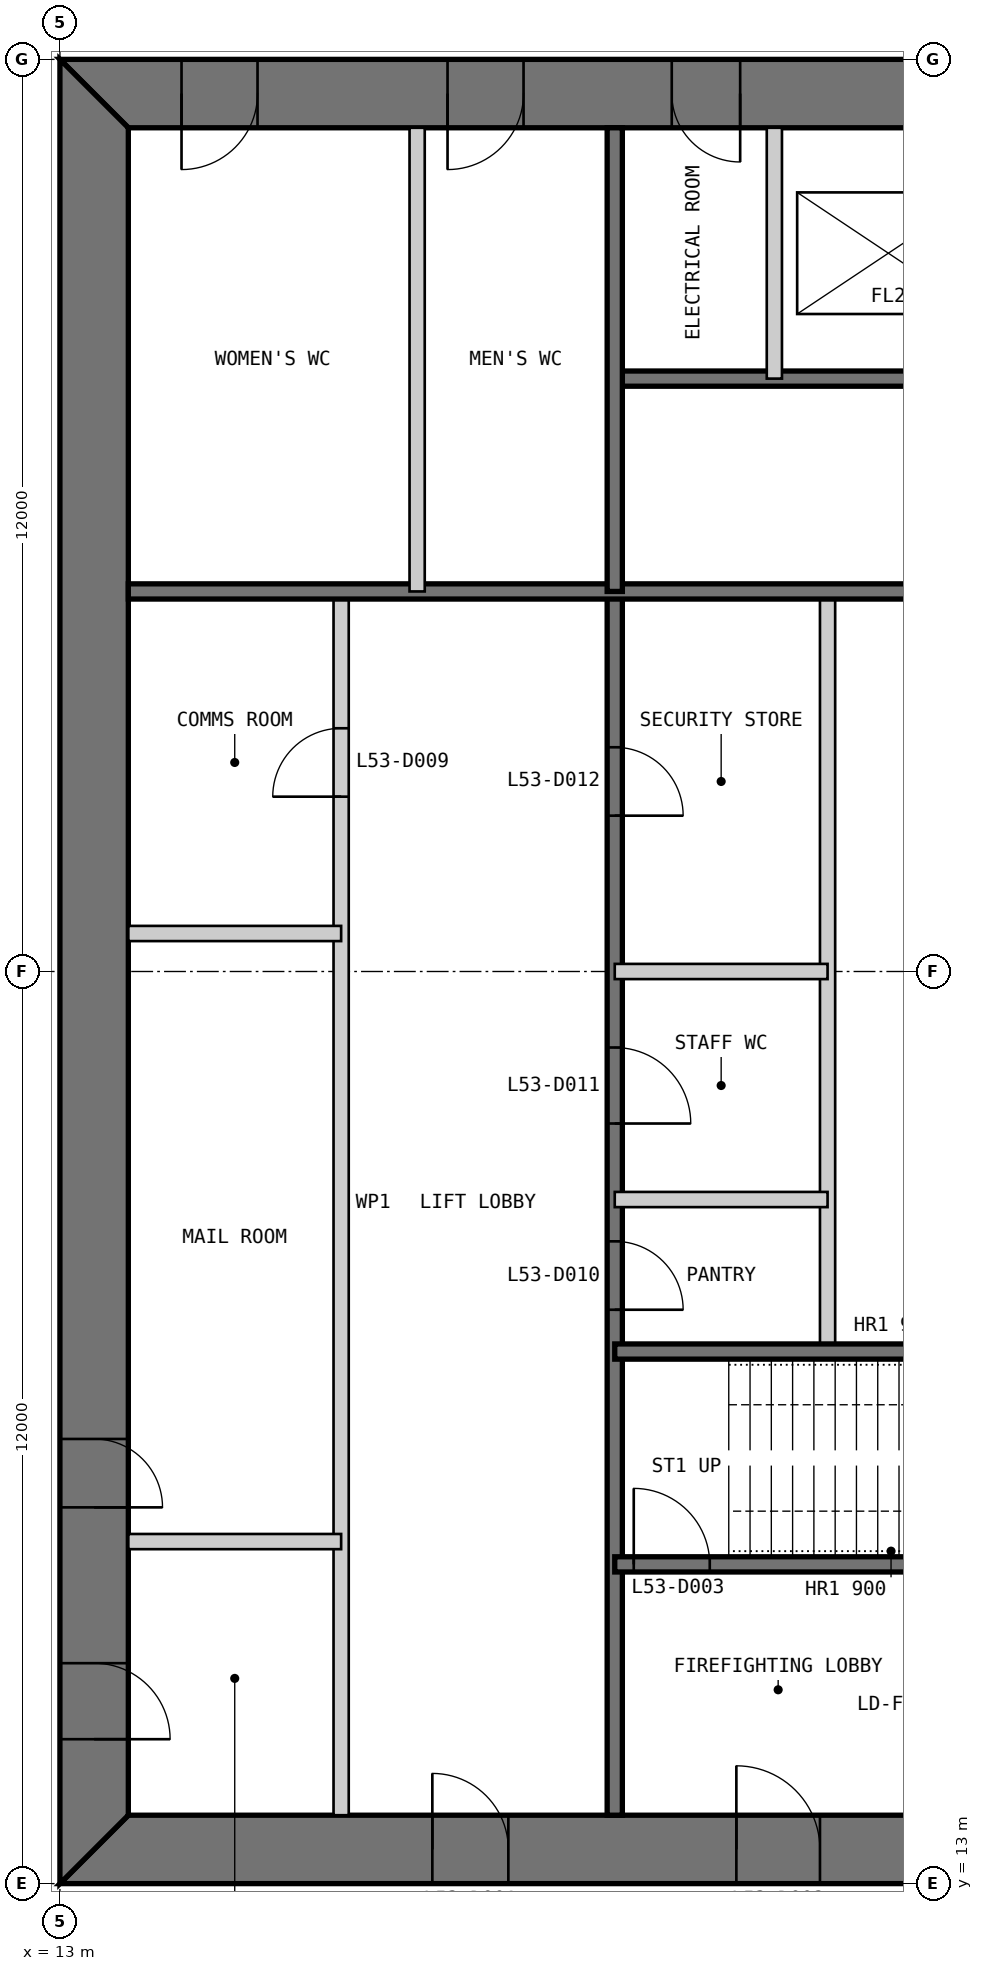
"""IFC4 building model, lengths in metres.
Left out: names, types, materials, properties, quantities, classifications, styles, units other than length and angle.
Written with IfcOpenShell. Run it as: python <this file> out.ifc"""

import sys

from ifc_helpers import new_model, si_unit, direction, frame, frame_2d, origin, place, context, subcontext, project, spatial, polyline, rectangle, outline, extrude, element, fill, save


model = new_model("IFC4")
c1 = context("Model", 3, precision=1e-05, world=origin(), true_north=direction((0.0, 1.0)))
c2 = subcontext(c1, "Body", "Model", "MODEL_VIEW")
j1 = project(units=[si_unit("LENGTHUNIT", "METRE"), si_unit("PLANEANGLEUNIT", "RADIAN")], contexts=[c1])
p1 = place(None, origin())
s1 = spatial("IfcSite", under=j1, at=p1, CompositionType="ELEMENT")
p2 = place(p1, origin())
s2 = spatial("IfcBuilding", under=s1, at=p2, CompositionType="ELEMENT")
p3 = place(p2, frame((0.0, 0.0, 225.8)))
s3 = spatial("IfcBuildingStorey", under=s2, at=p3, CompositionType="ELEMENT", Elevation=225.8)
p4 = place(p3, frame((13.0, 13.45, 0.0), z_axis=(0.0, 0.0, 1.0), x_axis=(1.0, 0.0, 0.0)))
e1 = element("IfcWall", 1, at=p4, inside=s3, PredefinedType="SHEAR", context=c2, shape_type="SweptSolid", body=[
    extrude(outline(polyline([(0.0, -0.45), (24.0, -0.45), (23.1, 0.45), (0.9, 0.45), (0.0, -0.45)])), origin(), (0.0, 0.0, 1.0), 4.0),
])
p5 = place(p4, frame((4.9, 0.0, 0.0)))
e2 = element("IfcOpeningElement", 2, at=p5, cuts=e1, PredefinedType="OPENING", context=c2, shape_type="SweptSolid", body=[
    extrude(rectangle(XDim=1.0, YDim=2.2, at=frame_2d((0.5, 1.1))), frame((0.0, 0.46, 0.0), z_axis=(0.0, -1.0, 0.0), x_axis=(1.0, 0.0, 0.0)), (0.0, 0.0, 1.0), 0.92),
])
p6 = place(p4, frame((8.9, 0.0, 0.0)))
e3 = element("IfcOpeningElement", 3, at=p6, cuts=e1, PredefinedType="OPENING", context=c2, shape_type="SweptSolid", body=[
    extrude(rectangle(XDim=1.1, YDim=2.2, at=frame_2d((0.55, 1.1))), frame((0.0, 0.46, 0.0), z_axis=(0.0, -1.0, 0.0), x_axis=(1.0, 0.0, 0.0)), (0.0, 0.0, 1.0), 0.92),
])
p7 = place(p4, frame((15.05, 0.0, 0.0)))
e4 = element("IfcOpeningElement", 4, at=p7, cuts=e1, PredefinedType="OPENING", context=c2, shape_type="SweptSolid", body=[
    extrude(rectangle(XDim=0.9, YDim=2.2, at=frame_2d((0.45, 1.1))), frame((0.0, 0.46, 0.0), z_axis=(0.0, -1.0, 0.0), x_axis=(1.0, 0.0, 0.0)), (0.0, 0.0, 1.0), 0.92),
])
p8 = place(p4, frame((17.9, 0.0, 0.0)))
e5 = element("IfcOpeningElement", 5, at=p8, cuts=e1, PredefinedType="OPENING", context=c2, shape_type="SweptSolid", body=[
    extrude(rectangle(XDim=1.0, YDim=2.2, at=frame_2d((0.5, 1.1))), frame((0.0, 0.46, 0.0), z_axis=(0.0, -1.0, 0.0), x_axis=(1.0, 0.0, 0.0)), (0.0, 0.0, 1.0), 0.92),
])
p9 = place(p4, frame((21.4, 0.0, 0.0)))
e6 = element("IfcOpeningElement", 6, at=p9, cuts=e1, PredefinedType="OPENING", context=c2, shape_type="SweptSolid", body=[
    extrude(rectangle(XDim=1.0, YDim=2.2, at=frame_2d((0.5, 1.1))), frame((0.0, 0.46, 0.0), z_axis=(0.0, -1.0, 0.0), x_axis=(1.0, 0.0, 0.0)), (0.0, 0.0, 1.0), 0.92),
])
p10 = place(p3, frame((37.0, 36.55, 0.0), z_axis=(0.0, 0.0, 1.0), x_axis=(-1.0, 0.0, 0.0)))
e7 = element("IfcWall", 7, at=p10, inside=s3, PredefinedType="SHEAR", context=c2, shape_type="SweptSolid", body=[
    extrude(outline(polyline([(0.0, -0.45), (24.0, -0.45), (23.1, 0.45), (0.9, 0.45), (0.0, -0.45)])), origin(), (0.0, 0.0, 1.0), 4.0),
])
p11 = place(p10, frame((4.9, 0.0, 0.0)))
e8 = element("IfcOpeningElement", 8, at=p11, cuts=e7, PredefinedType="OPENING", context=c2, shape_type="SweptSolid", body=[
    extrude(rectangle(XDim=1.0, YDim=2.2, at=frame_2d((0.5, 1.1))), frame((0.0, 0.46, 0.0), z_axis=(0.0, -1.0, 0.0), x_axis=(1.0, 0.0, 0.0)), (0.0, 0.0, 1.0), 0.92),
])
p12 = place(p10, frame((8.9, 0.0, 0.0)))
e9 = element("IfcOpeningElement", 9, at=p12, cuts=e7, PredefinedType="OPENING", context=c2, shape_type="SweptSolid", body=[
    extrude(rectangle(XDim=1.1, YDim=2.2, at=frame_2d((0.55, 1.1))), frame((0.0, 0.46, 0.0), z_axis=(0.0, -1.0, 0.0), x_axis=(1.0, 0.0, 0.0)), (0.0, 0.0, 1.0), 0.92),
])
p13 = place(p10, frame((15.05, 0.0, 0.0)))
e10 = element("IfcOpeningElement", 10, at=p13, cuts=e7, PredefinedType="OPENING", context=c2, shape_type="SweptSolid", body=[
    extrude(rectangle(XDim=0.9, YDim=2.2, at=frame_2d((0.45, 1.1))), frame((0.0, 0.46, 0.0), z_axis=(0.0, -1.0, 0.0), x_axis=(1.0, 0.0, 0.0)), (0.0, 0.0, 1.0), 0.92),
])
p14 = place(p10, frame((17.9, 0.0, 0.0)))
e11 = element("IfcOpeningElement", 11, at=p14, cuts=e7, PredefinedType="OPENING", context=c2, shape_type="SweptSolid", body=[
    extrude(rectangle(XDim=1.0, YDim=2.2, at=frame_2d((0.5, 1.1))), frame((0.0, 0.46, 0.0), z_axis=(0.0, -1.0, 0.0), x_axis=(1.0, 0.0, 0.0)), (0.0, 0.0, 1.0), 0.92),
])
p15 = place(p10, frame((21.4, 0.0, 0.0)))
e12 = element("IfcOpeningElement", 12, at=p15, cuts=e7, PredefinedType="OPENING", context=c2, shape_type="SweptSolid", body=[
    extrude(rectangle(XDim=1.0, YDim=2.2, at=frame_2d((0.5, 1.1))), frame((0.0, 0.46, 0.0), z_axis=(0.0, -1.0, 0.0), x_axis=(1.0, 0.0, 0.0)), (0.0, 0.0, 1.0), 0.92),
])
p16 = place(p3, frame((13.45, 36.1, 0.0), z_axis=(0.0, 0.0, 1.0), x_axis=(0.0, -1.0, 0.0)))
e13 = element("IfcWall", 13, at=p16, inside=s3, PredefinedType="SHEAR", context=c2, shape_type="SweptSolid", body=[
    extrude(outline(polyline([(-0.9, -0.45), (23.1, -0.45), (22.2, 0.45), (0.0, 0.45), (-0.9, -0.45)])), origin(), (0.0, 0.0, 1.0), 4.0),
])
p17 = place(p16, frame((20.2, 0.0, 0.0)))
e14 = element("IfcOpeningElement", 14, at=p17, cuts=e13, PredefinedType="OPENING", context=c2, shape_type="SweptSolid", body=[
    extrude(rectangle(XDim=1.0, YDim=2.2, at=frame_2d((0.5, 1.1))), frame((0.0, 0.46, 0.0), z_axis=(0.0, -1.0, 0.0), x_axis=(1.0, 0.0, 0.0)), (0.0, 0.0, 1.0), 0.92),
])
p18 = place(p16, frame((17.25, 0.0, 0.0)))
e15 = element("IfcOpeningElement", 15, at=p18, cuts=e13, PredefinedType="OPENING", context=c2, shape_type="SweptSolid", body=[
    extrude(rectangle(XDim=0.9, YDim=2.2, at=frame_2d((0.45, 1.1))), frame((0.0, 0.46, 0.0), z_axis=(0.0, -1.0, 0.0), x_axis=(1.0, 0.0, 0.0)), (0.0, 0.0, 1.0), 0.92),
])
p19 = place(p3, frame((16.7, 13.9, 0.0), z_axis=(0.0, 0.0, 1.0), x_axis=(0.0, 1.0, 0.0)))
e16 = element("IfcWall", 16, at=p19, inside=s3, PredefinedType="PARTITIONING", context=c2, shape_type="SweptSolid", body=[
    extrude(rectangle(XDim=16.1, YDim=0.2, at=frame_2d((8.05, 0.0))), origin(), (0.0, 0.0, 1.0), 3.8),
])
p20 = place(p19, frame((13.4, 0.0, 0.0)))
e17 = element("IfcOpeningElement", 17, at=p20, cuts=e16, PredefinedType="OPENING", context=c2, shape_type="SweptSolid", body=[
    extrude(rectangle(XDim=0.9, YDim=2.2, at=frame_2d((0.45, 1.1))), frame((0.0, 0.11, 0.0), z_axis=(0.0, -1.0, 0.0), x_axis=(1.0, 0.0, 0.0)), (0.0, 0.0, 1.0), 0.22),
])
p21 = place(p3, frame((20.3, 13.9, 0.0), z_axis=(0.0, 0.0, 1.0), x_axis=(0.0, 1.0, 0.0)))
e18 = element("IfcWall", 18, at=p21, inside=s3, PredefinedType="SOLIDWALL", context=c2, shape_type="SweptSolid", body=[
    extrude(rectangle(XDim=16.1, YDim=0.2, at=frame_2d((8.05, 0.0))), origin(), (0.0, 0.0, 1.0), 3.8),
])
p22 = place(p21, frame((6.65, 0.0, 0.0)))
e19 = element("IfcOpeningElement", 19, at=p22, cuts=e18, PredefinedType="OPENING", context=c2, shape_type="SweptSolid", body=[
    extrude(rectangle(XDim=0.9, YDim=2.2, at=frame_2d((0.45, 1.1))), frame((0.0, 0.11, 0.0), z_axis=(0.0, -1.0, 0.0), x_axis=(1.0, 0.0, 0.0)), (0.0, 0.0, 1.0), 0.22),
])
p23 = place(p21, frame((9.1, 0.0, 0.0)))
e20 = element("IfcOpeningElement", 20, at=p23, cuts=e18, PredefinedType="OPENING", context=c2, shape_type="SweptSolid", body=[
    extrude(rectangle(XDim=1.0, YDim=2.2, at=frame_2d((0.5, 1.1))), frame((0.0, 0.11, 0.0), z_axis=(0.0, -1.0, 0.0), x_axis=(1.0, 0.0, 0.0)), (0.0, 0.0, 1.0), 0.22),
])
p24 = place(p21, frame((13.15, 0.0, 0.0)))
e21 = element("IfcOpeningElement", 21, at=p24, cuts=e18, PredefinedType="OPENING", context=c2, shape_type="SweptSolid", body=[
    extrude(rectangle(XDim=0.9, YDim=2.2, at=frame_2d((0.45, 1.1))), frame((0.0, 0.11, 0.0), z_axis=(0.0, -1.0, 0.0), x_axis=(1.0, 0.0, 0.0)), (0.0, 0.0, 1.0), 0.22),
])
p25 = place(p3, frame((23.1, 20.0, 0.0), z_axis=(0.0, 0.0, 1.0), x_axis=(0.0, 1.0, 0.0)))
e22 = element("IfcWall", 22, at=p25, inside=s3, PredefinedType="PARTITIONING", context=c2, shape_type="SweptSolid", body=[
    extrude(rectangle(XDim=10.0, YDim=0.2, at=frame_2d((5.0, 0.0))), origin(), (0.0, 0.0, 1.0), 3.8),
])
p26 = place(p3, frame((20.3, 17.2, 0.0), z_axis=(0.0, 0.0, 1.0), x_axis=(1.0, 0.0, 0.0)))
e23 = element("IfcWall", 23, at=p26, inside=s3, PredefinedType="SOLIDWALL", context=c2, shape_type="SweptSolid", body=[
    extrude(rectangle(XDim=9.4, YDim=0.2, at=frame_2d((4.7, 0.0))), origin(), (0.0, 0.0, 1.0), 3.8),
])
p27 = place(p26, frame((0.25, 0.0, 0.0)))
e24 = element("IfcOpeningElement", 24, at=p27, cuts=e23, PredefinedType="OPENING", context=c2, shape_type="SweptSolid", body=[
    extrude(rectangle(XDim=1.0, YDim=2.2, at=frame_2d((0.5, 1.1))), frame((0.0, 0.11, 0.0), z_axis=(0.0, -1.0, 0.0), x_axis=(1.0, 0.0, 0.0)), (0.0, 0.0, 1.0), 0.22),
])
p28 = place(p3, frame((20.3, 20.0, 0.0), z_axis=(0.0, 0.0, 1.0), x_axis=(1.0, 0.0, 0.0)))
e25 = element("IfcWall", 25, at=p28, inside=s3, PredefinedType="SOLIDWALL", context=c2, shape_type="SweptSolid", body=[
    extrude(rectangle(XDim=15.8, YDim=0.2, at=frame_2d((7.9, 0.0))), origin(), (0.0, 0.0, 1.0), 3.8),
])
for number, where, z_axis, x_axis in (
    (26, (13.9, 17.5, 0.0), (0.0, 0.0, 1.0), (1.0, 0.0, 0.0)),
    (27, (13.9, 25.5, 0.0), (0.0, 0.0, 1.0), (1.0, 0.0, 0.0)),
    (28, (20.3, 22.0, 0.0), (0.0, 0.0, 1.0), (1.0, 0.0, 0.0)),
    (29, (20.3, 25.0, 0.0), (0.0, 0.0, 1.0), (1.0, 0.0, 0.0)),
):
    element("IfcWall", number, at=place(p3, frame(where, z_axis=z_axis, x_axis=x_axis)), inside=s3, PredefinedType="PARTITIONING", context=c2, shape_type="SweptSolid", body=[
        extrude(rectangle(XDim=2.8, YDim=0.2, at=frame_2d((1.4, 0.0))), origin(), (0.0, 0.0, 1.0), 3.8),
    ])
p29 = place(p3, frame((29.7, 32.8, 0.0), z_axis=(0.0, 0.0, 1.0), x_axis=(-1.0, 0.0, 0.0)))
e30 = element("IfcWall", 30, at=p29, inside=s3, PredefinedType="SOLIDWALL", context=c2, shape_type="SweptSolid", body=[
    extrude(rectangle(XDim=9.4, YDim=0.2, at=frame_2d((4.7, 0.0))), origin(), (0.0, 0.0, 1.0), 3.8),
])
p30 = place(p29, frame((0.25, 0.0, 0.0)))
e31 = element("IfcOpeningElement", 31, at=p30, cuts=e30, PredefinedType="OPENING", context=c2, shape_type="SweptSolid", body=[
    extrude(rectangle(XDim=1.0, YDim=2.2, at=frame_2d((0.5, 1.1))), frame((0.0, 0.11, 0.0), z_axis=(0.0, -1.0, 0.0), x_axis=(1.0, 0.0, 0.0)), (0.0, 0.0, 1.0), 0.22),
])
p31 = place(p3, frame((29.7, 30.0, 0.0), z_axis=(0.0, 0.0, 1.0), x_axis=(-1.0, 0.0, 0.0)))
e32 = element("IfcWall", 32, at=p31, inside=s3, PredefinedType="SOLIDWALL", context=c2, shape_type="SweptSolid", body=[
    extrude(rectangle(XDim=15.8, YDim=0.2, at=frame_2d((7.9, 0.0))), origin(), (0.0, 0.0, 1.0), 3.8),
])
p32 = place(p3, frame((22.4, 36.1, 0.0), z_axis=(0.0, 0.0, 1.0), x_axis=(0.0, -1.0, 0.0)))
e33 = element("IfcWall", 33, at=p32, inside=s3, PredefinedType="PARTITIONING", context=c2, shape_type="SweptSolid", body=[
    extrude(rectangle(XDim=3.3, YDim=0.2, at=frame_2d((1.65, 0.0))), origin(), (0.0, 0.0, 1.0), 3.8),
])
p33 = place(p3, frame((20.3, 36.1, 0.0), z_axis=(0.0, 0.0, 1.0), x_axis=(0.0, -1.0, 0.0)))
e34 = element("IfcWall", 34, at=p33, inside=s3, PredefinedType="SOLIDWALL", context=c2, shape_type="SweptSolid", body=[
    extrude(rectangle(XDim=6.1, YDim=0.2, at=frame_2d((3.05, 0.0))), origin(), (0.0, 0.0, 1.0), 3.8),
])
p34 = place(p3, frame((17.7, 36.1, 0.0), z_axis=(0.0, 0.0, 1.0), x_axis=(0.0, -1.0, 0.0)))
e35 = element("IfcWall", 35, at=p34, inside=s3, PredefinedType="PARTITIONING", context=c2, shape_type="SweptSolid", body=[
    extrude(rectangle(XDim=6.1, YDim=0.2, at=frame_2d((3.05, 0.0))), origin(), (0.0, 0.0, 1.0), 3.8),
])
p35 = place(p5, origin())
e36 = element("IfcDoor", 36, at=p35, inside=s3, OperationType="SINGLE_SWING_LEFT", PredefinedType="DOOR", context=c2, shape_type="SweptSolid", body=[
    extrude(rectangle(XDim=1.0, YDim=2.2, at=frame_2d((0.5, 1.1))), frame((0.0, 0.025, 0.0), z_axis=(0.0, -1.0, 0.0), x_axis=(1.0, 0.0, 0.0)), (0.0, 0.0, 1.0), 0.05),
    extrude(outline(polyline([(0.0, 0.0), (0.04, 0.0), (0.04, 2.16), (0.96, 2.16), (0.96, 0.0), (1.0, 0.0), (1.0, 2.2), (0.0, 2.2), (0.0, 0.0)])), frame((0.0, 0.3, 0.0), z_axis=(0.0, -1.0, 0.0), x_axis=(1.0, 0.0, 0.0)), (0.0, 0.0, 1.0), 0.6),
])
fill(e2, e36)
p36 = place(p6, origin())
e37 = element("IfcDoor", 37, at=p36, inside=s3, OperationType="SINGLE_SWING_LEFT", PredefinedType="DOOR", context=c2, shape_type="SweptSolid", body=[
    extrude(rectangle(XDim=1.1, YDim=2.2, at=frame_2d((0.55, 1.1))), frame((0.0, 0.025, 0.0), z_axis=(0.0, -1.0, 0.0), x_axis=(1.0, 0.0, 0.0)), (0.0, 0.0, 1.0), 0.05),
    extrude(outline(polyline([(0.0, 0.0), (0.04, 0.0), (0.04, 2.16), (1.06, 2.16), (1.06, 0.0), (1.1, 0.0), (1.1, 2.2), (0.0, 2.2), (0.0, 0.0)])), frame((0.0, 0.3, 0.0), z_axis=(0.0, -1.0, 0.0), x_axis=(1.0, 0.0, 0.0)), (0.0, 0.0, 1.0), 0.6),
])
fill(e3, e37)
p37 = place(p27, origin())
e38 = element("IfcDoor", 38, at=p37, inside=s3, OperationType="SINGLE_SWING_LEFT", PredefinedType="DOOR", context=c2, shape_type="SweptSolid", body=[
    extrude(rectangle(XDim=1.0, YDim=2.2, at=frame_2d((0.5, 1.1))), frame((0.0, 0.025, 0.0), z_axis=(0.0, -1.0, 0.0), x_axis=(1.0, 0.0, 0.0)), (0.0, 0.0, 1.0), 0.05),
])
fill(e24, e38)
p38 = place(p17, origin())
e39 = element("IfcDoor", 39, at=p38, inside=s3, OperationType="SINGLE_SWING_RIGHT", PredefinedType="DOOR", context=c2, shape_type="SweptSolid", body=[
    extrude(rectangle(XDim=1.0, YDim=2.2, at=frame_2d((0.5, 1.1))), frame((0.0, 0.025, 0.0), z_axis=(0.0, -1.0, 0.0), x_axis=(1.0, 0.0, 0.0)), (0.0, 0.0, 1.0), 0.05),
    extrude(outline(polyline([(0.0, 0.0), (0.04, 0.0), (0.04, 2.16), (0.96, 2.16), (0.96, 0.0), (1.0, 0.0), (1.0, 2.2), (0.0, 2.2), (0.0, 0.0)])), frame((0.0, 0.3, 0.0), z_axis=(0.0, -1.0, 0.0), x_axis=(1.0, 0.0, 0.0)), (0.0, 0.0, 1.0), 0.6),
])
fill(e14, e39)
p39 = place(p18, origin())
e40 = element("IfcDoor", 40, at=p39, inside=s3, OperationType="SINGLE_SWING_RIGHT", PredefinedType="DOOR", context=c2, shape_type="SweptSolid", body=[
    extrude(rectangle(XDim=0.9, YDim=2.2, at=frame_2d((0.45, 1.1))), frame((0.0, 0.025, 0.0), z_axis=(0.0, -1.0, 0.0), x_axis=(1.0, 0.0, 0.0)), (0.0, 0.0, 1.0), 0.05),
    extrude(outline(polyline([(0.0, 0.0), (0.04, 0.0), (0.04, 2.16), (0.86, 2.16), (0.86, 0.0), (0.9, 0.0), (0.9, 2.2), (0.0, 2.2), (0.0, 0.0)])), frame((0.0, 0.3, 0.0), z_axis=(0.0, -1.0, 0.0), x_axis=(1.0, 0.0, 0.0)), (0.0, 0.0, 1.0), 0.6),
])
fill(e15, e40)
p40 = place(p20, origin())
e41 = element("IfcDoor", 41, at=p40, inside=s3, OperationType="SINGLE_SWING_LEFT", PredefinedType="DOOR", context=c2, shape_type="SweptSolid", body=[
    extrude(rectangle(XDim=0.9, YDim=2.2, at=frame_2d((0.45, 1.1))), frame((0.0, 0.025, 0.0), z_axis=(0.0, -1.0, 0.0), x_axis=(1.0, 0.0, 0.0)), (0.0, 0.0, 1.0), 0.05),
])
fill(e17, e41)
p41 = place(p22, frame((0.9, 0.0, 0.0), z_axis=(0.0, 0.0, 1.0), x_axis=(-1.0, 0.0, 0.0)))
e42 = element("IfcDoor", 42, at=p41, inside=s3, OperationType="SINGLE_SWING_RIGHT", PredefinedType="DOOR", context=c2, shape_type="SweptSolid", body=[
    extrude(rectangle(XDim=0.9, YDim=2.2, at=frame_2d((0.45, 1.1))), frame((0.0, 0.025, 0.0), z_axis=(0.0, -1.0, 0.0), x_axis=(1.0, 0.0, 0.0)), (0.0, 0.0, 1.0), 0.05),
])
fill(e19, e42)
p42 = place(p23, frame((1.0, 0.0, 0.0), z_axis=(0.0, 0.0, 1.0), x_axis=(-1.0, 0.0, 0.0)))
e43 = element("IfcDoor", 43, at=p42, inside=s3, OperationType="SINGLE_SWING_RIGHT", PredefinedType="DOOR", context=c2, shape_type="SweptSolid", body=[
    extrude(rectangle(XDim=1.0, YDim=2.2, at=frame_2d((0.5, 1.1))), frame((0.0, 0.025, 0.0), z_axis=(0.0, -1.0, 0.0), x_axis=(1.0, 0.0, 0.0)), (0.0, 0.0, 1.0), 0.05),
])
fill(e20, e43)
p43 = place(p24, frame((0.9, 0.0, 0.0), z_axis=(0.0, 0.0, 1.0), x_axis=(-1.0, 0.0, 0.0)))
e44 = element("IfcDoor", 44, at=p43, inside=s3, OperationType="SINGLE_SWING_RIGHT", PredefinedType="DOOR", context=c2, shape_type="SweptSolid", body=[
    extrude(rectangle(XDim=0.9, YDim=2.2, at=frame_2d((0.45, 1.1))), frame((0.0, 0.025, 0.0), z_axis=(0.0, -1.0, 0.0), x_axis=(1.0, 0.0, 0.0)), (0.0, 0.0, 1.0), 0.05),
])
fill(e21, e44)
p44 = place(p13, origin())
e45 = element("IfcDoor", 45, at=p44, inside=s3, OperationType="SINGLE_SWING_LEFT", PredefinedType="DOOR", context=c2, shape_type="SweptSolid", body=[
    extrude(rectangle(XDim=0.9, YDim=2.2, at=frame_2d((0.45, 1.1))), frame((0.0, 0.025, 0.0), z_axis=(0.0, -1.0, 0.0), x_axis=(1.0, 0.0, 0.0)), (0.0, 0.0, 1.0), 0.05),
    extrude(outline(polyline([(0.0, 0.0), (0.04, 0.0), (0.04, 2.16), (0.86, 2.16), (0.86, 0.0), (0.9, 0.0), (0.9, 2.2), (0.0, 2.2), (0.0, 0.0)])), frame((0.0, 0.3, 0.0), z_axis=(0.0, -1.0, 0.0), x_axis=(1.0, 0.0, 0.0)), (0.0, 0.0, 1.0), 0.6),
])
fill(e10, e45)
p45 = place(p14, origin())
e46 = element("IfcDoor", 46, at=p45, inside=s3, OperationType="SINGLE_SWING_RIGHT", PredefinedType="DOOR", context=c2, shape_type="SweptSolid", body=[
    extrude(rectangle(XDim=1.0, YDim=2.2, at=frame_2d((0.5, 1.1))), frame((0.0, 0.025, 0.0), z_axis=(0.0, -1.0, 0.0), x_axis=(1.0, 0.0, 0.0)), (0.0, 0.0, 1.0), 0.05),
    extrude(outline(polyline([(0.0, 0.0), (0.04, 0.0), (0.04, 2.16), (0.96, 2.16), (0.96, 0.0), (1.0, 0.0), (1.0, 2.2), (0.0, 2.2), (0.0, 0.0)])), frame((0.0, 0.3, 0.0), z_axis=(0.0, -1.0, 0.0), x_axis=(1.0, 0.0, 0.0)), (0.0, 0.0, 1.0), 0.6),
])
fill(e11, e46)
p46 = place(p15, origin())
e47 = element("IfcDoor", 47, at=p46, inside=s3, OperationType="SINGLE_SWING_RIGHT", PredefinedType="DOOR", context=c2, shape_type="SweptSolid", body=[
    extrude(rectangle(XDim=1.0, YDim=2.2, at=frame_2d((0.5, 1.1))), frame((0.0, 0.025, 0.0), z_axis=(0.0, -1.0, 0.0), x_axis=(1.0, 0.0, 0.0)), (0.0, 0.0, 1.0), 0.05),
    extrude(outline(polyline([(0.0, 0.0), (0.04, 0.0), (0.04, 2.16), (0.96, 2.16), (0.96, 0.0), (1.0, 0.0), (1.0, 2.2), (0.0, 2.2), (0.0, 0.0)])), frame((0.0, 0.3, 0.0), z_axis=(0.0, -1.0, 0.0), x_axis=(1.0, 0.0, 0.0)), (0.0, 0.0, 1.0), 0.6),
])
fill(e12, e47)
save(model, sys.argv[1])
